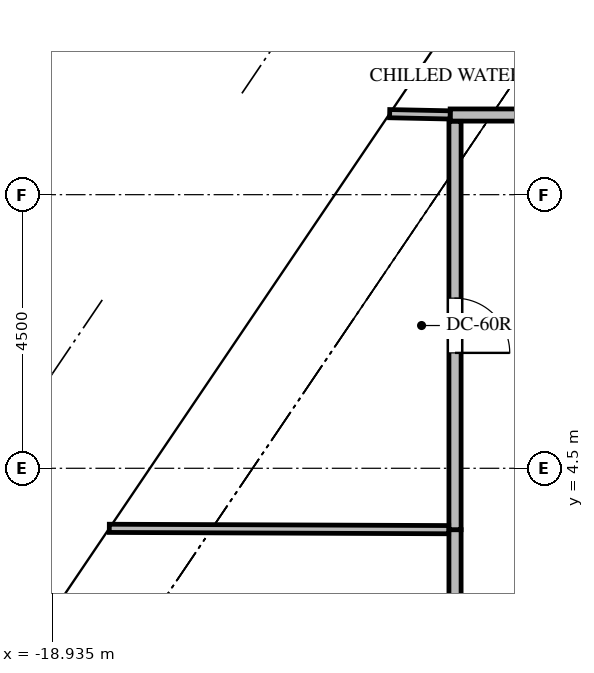
"""IFC4 building model, lengths in metres.
Left out: names, types, materials, properties, quantities, classifications, styles, units other than length and angle.
Written with IfcOpenShell. Run it as: python <this file> out.ifc"""

import sys

from ifc_helpers import new_model, si_unit, direction, frame, frame_2d, origin, place, context, subcontext, project, spatial, rectangle, extrude, source, transform, mapped, element, fill, save


model = new_model("IFC4")
c1 = context("Model", 3, precision=1e-05, world=origin(), true_north=direction((0.0, 1.0)))
c2 = subcontext(c1, "Body", "Model", "MODEL_VIEW")
j1 = project(units=[si_unit("LENGTHUNIT", "METRE"), si_unit("PLANEANGLEUNIT", "RADIAN")], contexts=[c1])
p1 = place(None, origin())
s1 = spatial("IfcSite", under=j1, at=p1, CompositionType="ELEMENT")
p2 = place(p1, origin())
s2 = spatial("IfcBuilding", under=s1, at=p2, CompositionType="ELEMENT")
p3 = place(p2, frame((0.0, 0.0, 213.4)))
s3 = spatial("IfcBuildingStorey", under=s2, at=p3, CompositionType="ELEMENT", Elevation=213.4)
p4 = place(p3, frame((-6.06, 10.31, 0.0), z_axis=(0.0, 0.0, 1.0), x_axis=(-1.0, 0.0, 0.0)))
e1 = element("IfcWall", 1, at=p4, inside=s3, PredefinedType="SOLIDWALL", context=c2, shape_type="SweptSolid", body=[
    extrude(rectangle(XDim=6.33, YDim=0.2, at=frame_2d((3.165, 0.0))), origin(), (0.0, 0.0, 1.0), 3.901),
])
p5 = place(p4, frame((0.35, 0.0, 0.0)))
e2 = element("IfcOpeningElement", 2, at=p5, cuts=e1, PredefinedType="OPENING", context=c2, shape_type="SweptSolid", body=[
    extrude(rectangle(XDim=0.9, YDim=2.05, at=frame_2d((0.45, 1.025))), frame((0.0, 0.11, 0.0), z_axis=(0.0, -1.0, 0.0), x_axis=(1.0, 0.0, 0.0)), (0.0, 0.0, 1.0), 0.22),
])
p6 = place(p3, frame((-12.31, 3.49, 0.0), z_axis=(0.0, 0.0, 1.0), x_axis=(0.0, -1.0, 0.0)))
e3 = element("IfcWall", 3, at=p6, inside=s3, PredefinedType="SOLIDWALL", context=c2, shape_type="SweptSolid", body=[
    extrude(rectangle(XDim=6.9, YDim=0.2, at=frame_2d((3.45, 0.0))), origin(), (0.0, 0.0, 1.0), 3.901),
])
p7 = place(p6, frame((3.0, 0.0, 0.0)))
e4 = element("IfcOpeningElement", 4, at=p7, cuts=e3, PredefinedType="OPENING", context=c2, shape_type="SweptSolid", body=[
    extrude(rectangle(XDim=0.9, YDim=2.05, at=frame_2d((0.45, 1.025))), frame((0.0, 0.11, 0.0), z_axis=(0.0, -1.0, 0.0), x_axis=(1.0, 0.0, 0.0)), (0.0, 0.0, 1.0), 0.22),
])
p8 = place(p3, frame((-12.31, 10.206, 0.0), z_axis=(0.0, 0.0, 1.0), x_axis=(0.0, -1.0, 0.0)))
e5 = element("IfcWall", 5, at=p8, inside=s3, PredefinedType="SOLIDWALL", context=c2, shape_type="SweptSolid", body=[
    extrude(rectangle(XDim=6.716, YDim=0.2, at=frame_2d((3.358, 0.0))), origin(), (0.0, 0.0, 1.0), 3.999),
])
p9 = place(p8, frame((2.908, 0.0, 0.0)))
e6 = element("IfcOpeningElement", 6, at=p9, cuts=e5, PredefinedType="OPENING", context=c2, shape_type="SweptSolid", body=[
    extrude(rectangle(XDim=0.9, YDim=2.05, at=frame_2d((0.45, 1.025))), frame((0.0, 0.11, 0.0), z_axis=(0.0, -1.0, 0.0), x_axis=(1.0, 0.0, 0.0)), (0.0, 0.0, 1.0), 0.22),
])
p10 = place(p3, frame((-12.39, 10.312, 0.0), z_axis=(0.0, 0.0, 1.0), x_axis=(-0.999782630862, 0.020849245246, 0.0)))
e7 = element("IfcWall", 7, at=p10, inside=s3, PredefinedType="PARTITIONING", context=c2, shape_type="SweptSolid", body=[
    extrude(rectangle(XDim=0.995, YDim=0.135, at=frame_2d((0.498, 0.0))), origin(), (0.0, 0.0, 1.0), 4.645),
])
p11 = place(p3, frame((-17.996, 3.512, 0.0), z_axis=(0.0, 0.0, 1.0), x_axis=(0.99999225143, -0.003936632956, 0.0)))
e8 = element("IfcWall", 8, at=p11, inside=s3, PredefinedType="PARTITIONING", context=c2, shape_type="SweptSolid", body=[
    extrude(rectangle(XDim=5.582, YDim=0.135, at=frame_2d((2.791, 0.0))), origin(), (0.0, 0.0, 1.0), 3.999),
])
m1 = source(origin(), c2, "Body", "SweptSolid", [
    extrude(rectangle(XDim=0.9, YDim=2.05, at=frame_2d((0.45, 1.025))), frame((0.0, 0.025, 0.0), z_axis=(0.0, -1.0, 0.0), x_axis=(1.0, 0.0, 0.0)), (0.0, 0.0, 1.0), 0.05),
])
p12 = place(p9, origin())
e9 = element("IfcDoor", 9, at=p12, inside=s3, OperationType="SINGLE_SWING_RIGHT", PredefinedType="DOOR", context=c2, shape_type="MappedRepresentation", body=[
    mapped(m1, transform((0.0, 0.0, 0.0), x_axis=(1.0, 0.0, 0.0), y_axis=(0.0, 1.0, 0.0), z_axis=(0.0, 0.0, 1.0), scale=1.0)),
])
fill(e6, e9)
save(model, sys.argv[1])
